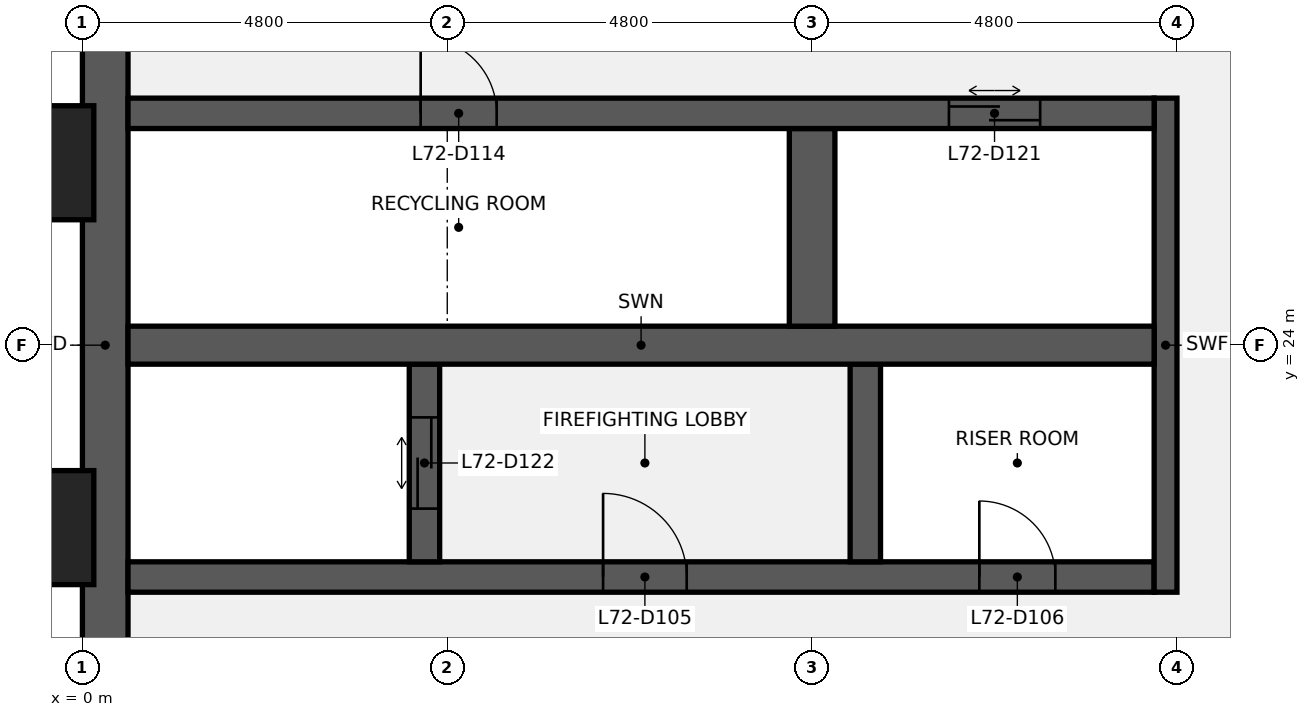
"""IFC4 building model, lengths in metres.
Left out: names, types, materials, properties, quantities, classifications, styles, units other than length and angle.
Written with IfcOpenShell. Run it as: python <this file> out.ifc"""

import sys

from ifc_helpers import new_model, si_unit, direction, frame, frame_2d, origin, origin_2d, place, context, subcontext, project, spatial, rectangle, extrude, element, fill, save


model = new_model("IFC4")
c1 = context("Model", 3, precision=1e-05, world=origin(), true_north=direction((0.0, 1.0)))
c2 = subcontext(c1, "Body", "Model", "MODEL_VIEW")
j1 = project(units=[si_unit("LENGTHUNIT", "METRE"), si_unit("PLANEANGLEUNIT", "RADIAN")], contexts=[c1])
p1 = place(None, origin())
s1 = spatial("IfcSite", under=j1, at=p1, CompositionType="ELEMENT")
p2 = place(p1, origin())
s2 = spatial("IfcBuilding", under=s1, at=p2, CompositionType="ELEMENT")
p3 = place(p2, frame((0.0, 0.0, 326.3)))
s3 = spatial("IfcBuildingStorey", under=s2, at=p3, CompositionType="ELEMENT", Elevation=326.3)
p4 = place(p3, frame((0.3, 9.6, 0.0), z_axis=(0.0, 0.0, 1.0), x_axis=(0.0, 1.0, 0.0)))
e1 = element("IfcWall", 1, at=p4, inside=s3, PredefinedType="SHEAR", context=c2, shape_type="SweptSolid", body=[
    extrude(rectangle(XDim=28.8, YDim=0.6, at=frame_2d((14.4, 0.0))), origin(), (0.0, 0.0, 1.0), 3.84),
])
p5 = place(p4, frame((8.85, 0.0, 0.9)))
e2 = element("IfcOpeningElement", 2, at=p5, cuts=e1, PredefinedType="OPENING", context=c2, shape_type="SweptSolid", body=[
    extrude(rectangle(XDim=1.5, YDim=1.5, at=frame_2d((0.75, 0.75))), frame((0.0, 0.31, 0.0), z_axis=(0.0, -1.0, 0.0), x_axis=(1.0, 0.0, 0.0)), (0.0, 0.0, 1.0), 0.62),
])
p6 = place(p4, frame((18.45, 0.0, 0.9)))
e3 = element("IfcOpeningElement", 3, at=p6, cuts=e1, PredefinedType="OPENING", context=c2, shape_type="SweptSolid", body=[
    extrude(rectangle(XDim=1.5, YDim=1.5, at=frame_2d((0.75, 0.75))), frame((0.0, 0.31, 0.0), z_axis=(0.0, -1.0, 0.0), x_axis=(1.0, 0.0, 0.0)), (0.0, 0.0, 1.0), 0.62),
])
p7 = place(p3, frame((0.6, 20.95, 0.0), z_axis=(0.0, 0.0, 1.0), x_axis=(1.0, 0.0, 0.0)))
e4 = element("IfcWall", 4, at=p7, inside=s3, PredefinedType="SHEAR", context=c2, shape_type="SweptSolid", body=[
    extrude(rectangle(XDim=13.5, YDim=0.4, at=frame_2d((6.75, 0.0))), origin(), (0.0, 0.0, 1.0), 3.84),
])
p8 = place(p7, frame((6.25, 0.0, 0.0)))
e5 = element("IfcOpeningElement", 5, at=p8, cuts=e4, PredefinedType="OPENING", context=c2, shape_type="SweptSolid", body=[
    extrude(rectangle(XDim=1.1, YDim=2.1, at=frame_2d((0.55, 1.05))), frame((0.0, 0.21, 0.0), z_axis=(0.0, -1.0, 0.0), x_axis=(1.0, 0.0, 0.0)), (0.0, 0.0, 1.0), 0.42),
])
p9 = place(p7, frame((11.2, 0.0, 0.0)))
e6 = element("IfcOpeningElement", 6, at=p9, cuts=e4, PredefinedType="OPENING", context=c2, shape_type="SweptSolid", body=[
    extrude(rectangle(XDim=1.0, YDim=2.1, at=frame_2d((0.5, 1.05))), frame((0.0, 0.21, 0.0), z_axis=(0.0, -1.0, 0.0), x_axis=(1.0, 0.0, 0.0)), (0.0, 0.0, 1.0), 0.42),
])
p10 = place(p3, frame((14.25, 20.75, 0.0), z_axis=(0.0, 0.0, 1.0), x_axis=(0.0, 1.0, 0.0)))
e7 = element("IfcWall", 7, at=p10, inside=s3, PredefinedType="SHEAR", context=c2, shape_type="SweptSolid", body=[
    extrude(rectangle(XDim=6.5, YDim=0.3, at=frame_2d((3.25, 0.0))), origin(), (0.0, 0.0, 1.0), 3.84),
])
p11 = place(p3, frame((4.5, 21.15, 0.0), z_axis=(0.0, 0.0, 1.0), x_axis=(0.0, 1.0, 0.0)))
e8 = element("IfcWall", 8, at=p11, inside=s3, PredefinedType="SHEAR", context=c2, shape_type="SweptSolid", body=[
    extrude(rectangle(XDim=2.6, YDim=0.4, at=frame_2d((1.3, 0.0))), origin(), (0.0, 0.0, 1.0), 3.84),
])
p12 = place(p11, frame((0.7, 0.0, 0.0)))
e9 = element("IfcOpeningElement", 9, at=p12, cuts=e8, PredefinedType="OPENING", context=c2, shape_type="SweptSolid", body=[
    extrude(rectangle(XDim=1.2, YDim=2.1, at=frame_2d((0.6, 1.05))), frame((0.0, 0.21, 0.0), z_axis=(0.0, -1.0, 0.0), x_axis=(1.0, 0.0, 0.0)), (0.0, 0.0, 1.0), 0.42),
])
p13 = place(p3, frame((10.3, 21.15, 0.0), z_axis=(0.0, 0.0, 1.0), x_axis=(0.0, 1.0, 0.0)))
e10 = element("IfcWall", 10, at=p13, inside=s3, PredefinedType="SHEAR", context=c2, shape_type="SweptSolid", body=[
    extrude(rectangle(XDim=2.6, YDim=0.4, at=frame_2d((1.3, 0.0))), origin(), (0.0, 0.0, 1.0), 3.84),
])
p14 = place(p3, frame((0.6, 24.0, 0.0), z_axis=(0.0, 0.0, 1.0), x_axis=(1.0, 0.0, 0.0)))
e11 = element("IfcWall", 11, at=p14, inside=s3, PredefinedType="SHEAR", context=c2, shape_type="SweptSolid", body=[
    extrude(rectangle(XDim=13.5, YDim=0.5, at=frame_2d((6.75, 0.0))), origin(), (0.0, 0.0, 1.0), 3.84),
])
p15 = place(p3, frame((9.6, 24.25, 0.0), z_axis=(0.0, 0.0, 1.0), x_axis=(0.0, 1.0, 0.0)))
e12 = element("IfcWall", 12, at=p15, inside=s3, PredefinedType="SHEAR", context=c2, shape_type="SweptSolid", body=[
    extrude(rectangle(XDim=2.6, YDim=0.6, at=frame_2d((1.3, 0.0))), origin(), (0.0, 0.0, 1.0), 3.84),
])
p16 = place(p3, frame((0.6, 27.05, 0.0), z_axis=(0.0, 0.0, 1.0), x_axis=(1.0, 0.0, 0.0)))
e13 = element("IfcWall", 13, at=p16, inside=s3, PredefinedType="SHEAR", context=c2, shape_type="SweptSolid", body=[
    extrude(rectangle(XDim=13.5, YDim=0.4, at=frame_2d((6.75, 0.0))), origin(), (0.0, 0.0, 1.0), 3.84),
])
p17 = place(p16, frame((3.85, 0.0, 0.0)))
e14 = element("IfcOpeningElement", 14, at=p17, cuts=e13, PredefinedType="OPENING", context=c2, shape_type="SweptSolid", body=[
    extrude(rectangle(XDim=1.0, YDim=2.1, at=frame_2d((0.5, 1.05))), frame((0.0, 0.21, 0.0), z_axis=(0.0, -1.0, 0.0), x_axis=(1.0, 0.0, 0.0)), (0.0, 0.0, 1.0), 0.42),
])
p18 = place(p16, frame((10.8, 0.0, 0.0)))
e15 = element("IfcOpeningElement", 15, at=p18, cuts=e13, PredefinedType="OPENING", context=c2, shape_type="SweptSolid", body=[
    extrude(rectangle(XDim=1.2, YDim=2.1, at=frame_2d((0.6, 1.05))), frame((0.0, 0.21, 0.0), z_axis=(0.0, -1.0, 0.0), x_axis=(1.0, 0.0, 0.0)), (0.0, 0.0, 1.0), 0.42),
])
for number, where, z_axis, x_axis in (
    (16, (-0.75, 21.6, 0.0), (0.0, 0.0, 1.0), (0.0, 1.0, 0.0)),
    (17, (-0.75, 26.4, 0.0), (0.0, 0.0, 1.0), (0.0, 1.0, 0.0)),
):
    element("IfcColumn", number, at=place(p3, frame(where, z_axis=z_axis, x_axis=x_axis)), inside=s3, PredefinedType="PILASTER", context=c2, shape_type="SweptSolid", body=[
        extrude(rectangle(XDim=1.8, YDim=1.5, at=origin_2d()), origin(), (0.0, 0.0, 1.0), 4.0),
    ])
p19 = place(p8, origin())
e18 = element("IfcDoor", 18, at=p19, inside=s3, OperationType="SINGLE_SWING_LEFT", PredefinedType="DOOR", context=c2, shape_type="SweptSolid", body=[
    extrude(rectangle(XDim=1.1, YDim=2.1, at=frame_2d((0.55, 1.05))), frame((0.0, 0.025, 0.0), z_axis=(0.0, -1.0, 0.0), x_axis=(1.0, 0.0, 0.0)), (0.0, 0.0, 1.0), 0.05),
])
fill(e5, e18)
p20 = place(p9, origin())
e19 = element("IfcDoor", 19, at=p20, inside=s3, OperationType="SINGLE_SWING_LEFT", PredefinedType="DOOR", context=c2, shape_type="SweptSolid", body=[
    extrude(rectangle(XDim=1.0, YDim=2.1, at=frame_2d((0.5, 1.05))), frame((0.0, 0.025, 0.0), z_axis=(0.0, -1.0, 0.0), x_axis=(1.0, 0.0, 0.0)), (0.0, 0.0, 1.0), 0.05),
])
fill(e6, e19)
p21 = place(p17, origin())
e20 = element("IfcDoor", 20, at=p21, inside=s3, OperationType="SINGLE_SWING_LEFT", PredefinedType="DOOR", context=c2, shape_type="SweptSolid", body=[
    extrude(rectangle(XDim=1.0, YDim=2.1, at=frame_2d((0.5, 1.05))), frame((0.0, 0.025, 0.0), z_axis=(0.0, -1.0, 0.0), x_axis=(1.0, 0.0, 0.0)), (0.0, 0.0, 1.0), 0.05),
])
fill(e14, e20)
p22 = place(p18, origin())
e21 = element("IfcDoor", 21, at=p22, inside=s3, OperationType="DOUBLE_DOOR_SLIDING", PredefinedType="DOOR", context=c2, shape_type="SweptSolid", body=[
    extrude(rectangle(XDim=1.2, YDim=2.1, at=frame_2d((0.6, 1.05))), frame((0.0, 0.025, 0.0), z_axis=(0.0, -1.0, 0.0), x_axis=(1.0, 0.0, 0.0)), (0.0, 0.0, 1.0), 0.05),
])
fill(e15, e21)
p23 = place(p12, origin())
e22 = element("IfcDoor", 22, at=p23, inside=s3, OperationType="DOUBLE_DOOR_SLIDING", PredefinedType="DOOR", context=c2, shape_type="SweptSolid", body=[
    extrude(rectangle(XDim=1.2, YDim=2.1, at=frame_2d((0.6, 1.05))), frame((0.0, 0.025, 0.0), z_axis=(0.0, -1.0, 0.0), x_axis=(1.0, 0.0, 0.0)), (0.0, 0.0, 1.0), 0.05),
])
fill(e9, e22)
save(model, sys.argv[1])
